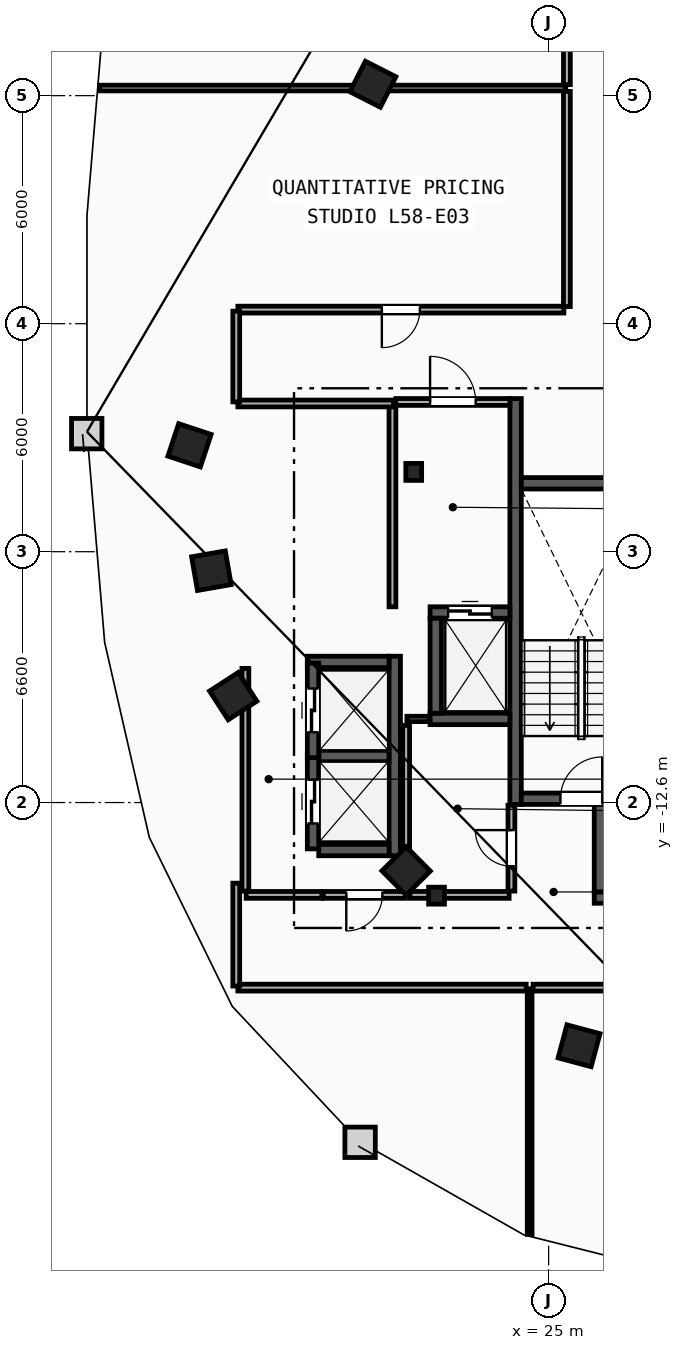
"""IFC4 building model, lengths in metres.
Left out: names, types, materials, properties, quantities, classifications, styles, units other than length and angle.
Written with IfcOpenShell. Run it as: python <this file> out.ifc"""

import sys

from ifc_helpers import new_model, si_unit, direction, frame, frame_2d, origin, origin_2d, place, context, subcontext, project, spatial, rectangle, i_section, extrude, element, fill, save


model = new_model("IFC4")
c1 = context("Model", 3, precision=1e-05, world=origin(), true_north=direction((0.0, 1.0)))
c2 = subcontext(c1, "Body", "Model", "MODEL_VIEW")
j1 = project(units=[si_unit("LENGTHUNIT", "METRE"), si_unit("PLANEANGLEUNIT", "RADIAN")], contexts=[c1])
p1 = place(None, origin())
s1 = spatial("IfcSite", under=j1, at=p1, CompositionType="ELEMENT")
p2 = place(p1, origin())
s2 = spatial("IfcBuilding", under=s1, at=p2, CompositionType="ELEMENT")
p3 = place(p2, frame((0.0, 0.0, 220.6)))
s3 = spatial("IfcBuildingStorey", under=s2, at=p3, CompositionType="ELEMENT", Elevation=220.6)
for number, where, z_axis, x_axis in (
    (1, (21.45, -3.9, 0.0), (0.0, 0.0, 1.0), (1.0, 0.0, 0.0)),
    (2, (22.05, -15.05, 0.0), (0.0, 0.0, 1.0), (1.0, 0.0, 0.0)),
):
    element("IfcColumn", number, at=place(p3, frame(where, z_axis=z_axis, x_axis=x_axis)), inside=s3, PredefinedType="COLUMN", context=c2, shape_type="SweptSolid", body=[
        extrude(i_section(OverallWidth=0.416, OverallDepth=0.446, WebThickness=0.039, FlangeThickness=0.063, FilletRadius=0.018, at=origin_2d()), origin(), (0.0, 0.0, 1.0), 3.6),
    ])
for number, where, z_axis, x_axis in (
    (3, (15.55, -3.2, 0.0), (0.0, 0.0, 1.0), (-0.315, -0.949, 0.0)),
    (4, (16.125, -6.5, 0.0), (0.0, 0.0, 1.0), (0.172, -0.985, 0.0)),
    (5, (16.7, -9.8, 0.0), (0.0, 0.0, 1.0), (0.544, -0.839, 0.0)),
    (6, (21.25, -14.4, 0.0), (0.0, 0.0, 1.0), (0.703, -0.711, 0.0)),
    (7, (25.8, -19.0, 0.0), (0.0, 0.0, 1.0), (0.966, -0.259, 0.0)),
    (8, (20.375, 6.3, 0.0), (0.0, 0.0, 1.0), (-0.453, -0.892, 0.0)),
):
    element("IfcColumn", number, at=place(p3, frame(where, z_axis=z_axis, x_axis=x_axis)), inside=s3, PredefinedType="COLUMN", context=c2, shape_type="SweptSolid", body=[
        extrude(rectangle(XDim=0.9, YDim=0.9, at=origin_2d()), origin(), (0.0, 0.0, 1.0), 3.6),
    ])
p4 = place(p3, frame((24.13, -12.65, 0.0), z_axis=(0.0, 0.0, 1.0), x_axis=(0.0, 1.0, 0.0)))
e9 = element("IfcWall", 9, at=p4, inside=s3, PredefinedType="SHEAR", context=c2, shape_type="SweptSolid", body=[
    extrude(rectangle(XDim=10.68, YDim=0.3, at=frame_2d((5.34, 0.0))), origin(), (0.0, 0.0, 1.0), 3.34),
])
p5 = place(p3, frame((24.28, -12.5, 0.0), z_axis=(0.0, 0.0, 1.0), x_axis=(1.0, 0.0, 0.0)))
e10 = element("IfcWall", 10, at=p5, inside=s3, PredefinedType="SHEAR", context=c2, shape_type="SweptSolid", body=[
    extrude(rectangle(XDim=3.16, YDim=0.3, at=frame_2d((1.58, 0.0))), origin(), (0.0, 0.0, 1.0), 3.34),
])
p6 = place(p5, frame((1.03, 0.0, 0.0)))
e11 = element("IfcOpeningElement", 11, at=p6, cuts=e10, PredefinedType="OPENING", context=c2, shape_type="SweptSolid", body=[
    extrude(rectangle(XDim=1.1, YDim=2.15, at=frame_2d((0.55, 1.075))), frame((0.0, 0.16, 0.0), z_axis=(0.0, -1.0, 0.0), x_axis=(1.0, 0.0, 0.0)), (0.0, 0.0, 1.0), 0.32),
])
p7 = place(p3, frame((24.28, -4.2, 0.0), z_axis=(0.0, 0.0, 1.0), x_axis=(1.0, 0.0, 0.0)))
e12 = element("IfcWall", 12, at=p7, inside=s3, PredefinedType="SHEAR", context=c2, shape_type="SweptSolid", body=[
    extrude(rectangle(XDim=3.16, YDim=0.3, at=frame_2d((1.58, 0.0))), origin(), (0.0, 0.0, 1.0), 3.34),
])
p8 = place(p3, frame((20.89, -7.45, 0.0), z_axis=(0.0, 0.0, 1.0), x_axis=(0.0, 1.0, 0.0)))
e13 = element("IfcWall", 13, at=p8, inside=s3, PredefinedType="PARTITIONING", context=c2, shape_type="SweptSolid", body=[
    extrude(rectangle(XDim=5.3, YDim=0.18, at=frame_2d((2.65, 0.0))), origin(), (0.0, 0.0, 1.0), 3.34),
])
p9 = place(p3, frame((20.98, -2.06, 0.0), z_axis=(0.0, 0.0, 1.0), x_axis=(1.0, 0.0, 0.0)))
e14 = element("IfcWall", 14, at=p9, inside=s3, PredefinedType="PARTITIONING", context=c2, shape_type="SweptSolid", body=[
    extrude(rectangle(XDim=3.0, YDim=0.18, at=frame_2d((1.5, 0.0))), origin(), (0.0, 0.0, 1.0), 3.34),
])
p10 = place(p9, frame((0.9, 0.0, 0.0)))
e15 = element("IfcOpeningElement", 15, at=p10, cuts=e14, PredefinedType="OPENING", context=c2, shape_type="SweptSolid", body=[
    extrude(rectangle(XDim=1.2, YDim=2.15, at=frame_2d((0.6, 1.075))), frame((0.0, 0.1, 0.0), z_axis=(0.0, -1.0, 0.0), x_axis=(1.0, 0.0, 0.0)), (0.0, 0.0, 1.0), 0.2),
])
p11 = place(p3, frame((21.88, -7.6, 0.0), z_axis=(0.0, 0.0, 1.0), x_axis=(1.0, 0.0, 0.0)))
e16 = element("IfcWall", 16, at=p11, inside=s3, PredefinedType="SHEAR", context=c2, shape_type="SweptSolid", body=[
    extrude(rectangle(XDim=2.1, YDim=0.3, at=frame_2d((1.05, 0.0))), origin(), (0.0, 0.0, 1.0), 3.34),
])
p12 = place(p11, frame((0.475, 0.0, 0.0)))
e17 = element("IfcOpeningElement", 17, at=p12, cuts=e16, PredefinedType="OPENING", context=c2, shape_type="SweptSolid", body=[
    extrude(rectangle(XDim=1.15, YDim=2.2, at=frame_2d((0.575, 1.1))), frame((0.0, 0.16, 0.0), z_axis=(0.0, -1.0, 0.0), x_axis=(1.0, 0.0, 0.0)), (0.0, 0.0, 1.0), 0.32),
])
p13 = place(p3, frame((21.88, -10.4, 0.0), z_axis=(0.0, 0.0, 1.0), x_axis=(1.0, 0.0, 0.0)))
e18 = element("IfcWall", 18, at=p13, inside=s3, PredefinedType="SHEAR", context=c2, shape_type="SweptSolid", body=[
    extrude(rectangle(XDim=2.1, YDim=0.3, at=frame_2d((1.05, 0.0))), origin(), (0.0, 0.0, 1.0), 3.34),
])
for number, where, z_axis, x_axis in (
    (19, (22.03, -10.25, 0.0), (0.0, 0.0, 1.0), (0.0, 1.0, 0.0)),
    (20, (26.2, -15.1, 0.0), (0.0, 0.0, 1.0), (1.0, 0.0, 0.0)),
):
    element("IfcWall", number, at=place(p3, frame(where, z_axis=z_axis, x_axis=x_axis)), inside=s3, PredefinedType="SHEAR", context=c2, shape_type="SweptSolid", body=[
        extrude(rectangle(XDim=2.5, YDim=0.3, at=frame_2d((1.25, 0.0))), origin(), (0.0, 0.0, 1.0), 3.34),
    ])
p14 = place(p3, frame((26.35, -14.95, 0.0), z_axis=(0.0, 0.0, 1.0), x_axis=(0.0, 1.0, 0.0)))
e21 = element("IfcWall", 21, at=p14, inside=s3, PredefinedType="SHEAR", context=c2, shape_type="SweptSolid", body=[
    extrude(rectangle(XDim=2.3, YDim=0.3, at=frame_2d((1.15, 0.0))), origin(), (0.0, 0.0, 1.0), 3.34),
])
p15 = place(p3, frame((20.95, -14.0, 0.0), z_axis=(0.0, 0.0, 1.0), x_axis=(0.0, 1.0, 0.0)))
e22 = element("IfcWall", 22, at=p15, inside=s3, PredefinedType="SHEAR", context=c2, shape_type="SweptSolid", body=[
    extrude(rectangle(XDim=5.25, YDim=0.3, at=frame_2d((2.625, 0.0))), origin(), (0.0, 0.0, 1.0), 3.34),
])
p16 = place(p3, frame((18.95, -13.85, 0.0), z_axis=(0.0, 0.0, 1.0), x_axis=(1.0, 0.0, 0.0)))
e23 = element("IfcWall", 23, at=p16, inside=s3, PredefinedType="SHEAR", context=c2, shape_type="SweptSolid", body=[
    extrude(rectangle(XDim=1.85, YDim=0.3, at=frame_2d((0.925, 0.0))), origin(), (0.0, 0.0, 1.0), 3.34),
])
p17 = place(p3, frame((18.65, -8.9, 0.0), z_axis=(0.0, 0.0, 1.0), x_axis=(1.0, 0.0, 0.0)))
e24 = element("IfcWall", 24, at=p17, inside=s3, PredefinedType="SHEAR", context=c2, shape_type="SweptSolid", body=[
    extrude(rectangle(XDim=2.15, YDim=0.3, at=frame_2d((1.075, 0.0))), origin(), (0.0, 0.0, 1.0), 3.34),
])
p18 = place(p3, frame((18.95, -11.375, 0.0), z_axis=(0.0, 0.0, 1.0), x_axis=(1.0, 0.0, 0.0)))
e25 = element("IfcWall", 25, at=p18, inside=s3, PredefinedType="SHEAR", context=c2, shape_type="SweptSolid", body=[
    extrude(rectangle(XDim=1.85, YDim=0.3, at=frame_2d((0.925, 0.0))), origin(), (0.0, 0.0, 1.0), 3.34),
])
p19 = place(p3, frame((18.8, -13.82, 0.0), z_axis=(0.0, 0.0, 1.0), x_axis=(0.0, 1.0, 0.0)))
e26 = element("IfcWall", 26, at=p19, inside=s3, PredefinedType="SHEAR", context=c2, shape_type="SweptSolid", body=[
    extrude(rectangle(XDim=2.49, YDim=0.3, at=frame_2d((1.245, 0.0))), origin(), (0.0, 0.0, 1.0), 3.34),
])
p20 = place(p19, frame((0.67, 0.0, 0.0)))
e27 = element("IfcOpeningElement", 27, at=p20, cuts=e26, PredefinedType="OPENING", context=c2, shape_type="SweptSolid", body=[
    extrude(rectangle(XDim=1.15, YDim=2.2, at=frame_2d((0.575, 1.1))), frame((0.0, 0.16, 0.0), z_axis=(0.0, -1.0, 0.0), x_axis=(1.0, 0.0, 0.0)), (0.0, 0.0, 1.0), 0.32),
])
p21 = place(p3, frame((18.8, -11.42, 0.0), z_axis=(0.0, 0.0, 1.0), x_axis=(0.0, 1.0, 0.0)))
e28 = element("IfcWall", 28, at=p21, inside=s3, PredefinedType="SHEAR", context=c2, shape_type="SweptSolid", body=[
    extrude(rectangle(XDim=2.49, YDim=0.3, at=frame_2d((1.245, 0.0))), origin(), (0.0, 0.0, 1.0), 3.34),
])
p22 = place(p21, frame((0.67, 0.0, 0.0)))
e29 = element("IfcOpeningElement", 29, at=p22, cuts=e28, PredefinedType="OPENING", context=c2, shape_type="SweptSolid", body=[
    extrude(rectangle(XDim=1.15, YDim=2.2, at=frame_2d((0.575, 1.1))), frame((0.0, 0.16, 0.0), z_axis=(0.0, -1.0, 0.0), x_axis=(1.0, 0.0, 0.0)), (0.0, 0.0, 1.0), 0.32),
])
p23 = place(p3, frame((17.02, -14.93, 0.0), z_axis=(0.0, 0.0, 1.0), x_axis=(0.0, 1.0, 0.0)))
e30 = element("IfcWall", 30, at=p23, inside=s3, PredefinedType="PARTITIONING", context=c2, shape_type="SweptSolid", body=[
    extrude(rectangle(XDim=5.86, YDim=0.18, at=frame_2d((2.93, 0.0))), origin(), (0.0, 0.0, 1.0), 3.34),
])
p24 = place(p3, frame((17.04, -15.03, 0.0), z_axis=(0.0, 0.0, 1.0), x_axis=(1.0, 0.0, 0.0)))
e31 = element("IfcWall", 31, at=p24, inside=s3, PredefinedType="PARTITIONING", context=c2, shape_type="SweptSolid", body=[
    extrude(rectangle(XDim=1.99, YDim=0.18, at=frame_2d((0.995, 0.0))), origin(), (0.0, 0.0, 1.0), 3.34),
])
p25 = place(p3, frame((21.23, -15.03, 0.0), z_axis=(0.0, 0.0, 1.0), x_axis=(-1.0, 0.0, 0.0)))
e32 = element("IfcWall", 32, at=p25, inside=s3, PredefinedType="PARTITIONING", context=c2, shape_type="SweptSolid", body=[
    extrude(rectangle(XDim=2.16, YDim=0.18, at=frame_2d((1.08, 0.0))), origin(), (0.0, 0.0, 1.0), 3.34),
])
p26 = place(p25, frame((0.605, 0.0, 0.0)))
e33 = element("IfcOpeningElement", 33, at=p26, cuts=e32, PredefinedType="OPENING", context=c2, shape_type="SweptSolid", body=[
    extrude(rectangle(XDim=0.95, YDim=2.1, at=frame_2d((0.475, 1.05))), frame((0.0, 0.1, 0.0), z_axis=(0.0, -1.0, 0.0), x_axis=(1.0, 0.0, 0.0)), (0.0, 0.0, 1.0), 0.2),
])
p27 = place(p3, frame((21.27, -10.4, 0.0), z_axis=(0.0, 0.0, 1.0), x_axis=(1.0, 0.0, 0.0)))
e34 = element("IfcWall", 34, at=p27, inside=s3, PredefinedType="PARTITIONING", context=c2, shape_type="SweptSolid", body=[
    extrude(rectangle(XDim=0.59, YDim=0.14, at=frame_2d((0.295, 0.0))), origin(), (0.0, 0.0, 1.0), 3.34),
])
p28 = place(p3, frame((21.25, -14.93, 0.0), z_axis=(0.0, 0.0, 1.0), x_axis=(0.0, 1.0, 0.0)))
e35 = element("IfcWall", 35, at=p28, inside=s3, PredefinedType="PARTITIONING", context=c2, shape_type="SweptSolid", body=[
    extrude(rectangle(XDim=4.36, YDim=0.18, at=frame_2d((2.18, 0.0))), origin(), (0.0, 0.0, 1.0), 3.34),
])
p29 = place(p3, frame((21.35, -15.03, 0.0), z_axis=(0.0, 0.0, 1.0), x_axis=(1.0, 0.0, 0.0)))
e36 = element("IfcWall", 36, at=p29, inside=s3, PredefinedType="PARTITIONING", context=c2, shape_type="SweptSolid", body=[
    extrude(rectangle(XDim=2.61, YDim=0.18, at=frame_2d((1.305, 0.0))), origin(), (0.0, 0.0, 1.0), 2.413),
])
p30 = place(p3, frame((24.02, -14.93, 0.0), z_axis=(0.0, 0.0, 1.0), x_axis=(0.0, 1.0, 0.0)))
e37 = element("IfcWall", 37, at=p30, inside=s3, PredefinedType="PARTITIONING", context=c2, shape_type="SweptSolid", body=[
    extrude(rectangle(XDim=2.26, YDim=0.18, at=frame_2d((1.13, 0.0))), origin(), (0.0, 0.0, 1.0), 3.34),
])
p31 = place(p30, frame((0.655, 0.0, 0.0)))
e38 = element("IfcOpeningElement", 38, at=p31, cuts=e37, PredefinedType="OPENING", context=c2, shape_type="SweptSolid", body=[
    extrude(rectangle(XDim=0.95, YDim=2.1, at=frame_2d((0.475, 1.05))), frame((0.0, 0.1, 0.0), z_axis=(0.0, -1.0, 0.0), x_axis=(1.0, 0.0, 0.0)), (0.0, 0.0, 1.0), 0.2),
])
p32 = place(p3, frame((13.183, 6.2, 0.0), z_axis=(0.0, 0.0, 1.0), x_axis=(1.0, 0.0, 0.0)))
e39 = element("IfcWall", 39, at=p32, inside=s3, PredefinedType="PARTITIONING", context=c2, shape_type="SweptSolid", body=[
    extrude(rectangle(XDim=12.267, YDim=0.15, at=frame_2d((6.133, 0.0))), origin(), (0.0, 0.0, 1.0), 3.34),
])
p33 = place(p3, frame((24.5, -23.963, 0.0), z_axis=(0.0, 0.0, 1.0), x_axis=(0.0, 1.0, 0.0)))
e40 = element("IfcWall", 40, at=p33, inside=s3, PredefinedType="PARTITIONING", context=c2, shape_type="SweptSolid", body=[
    extrude(rectangle(XDim=6.463, YDim=0.125, at=frame_2d((3.231, 0.0))), origin(), (0.0, 0.0, 1.0), 3.34),
])
p34 = place(p3, frame((24.59, -17.47, 0.0), z_axis=(0.0, 0.0, 1.0), x_axis=(1.0, 0.0, 0.0)))
e41 = element("IfcWall", 41, at=p34, inside=s3, PredefinedType="PARTITIONING", context=c2, shape_type="SweptSolid", body=[
    extrude(rectangle(XDim=7.82, YDim=0.18, at=frame_2d((3.91, 0.0))), origin(), (0.0, 0.0, 1.0), 3.34),
])
p35 = place(p34, frame((3.41, 0.0, 0.0)))
e42 = element("IfcOpeningElement", 42, at=p35, cuts=e41, PredefinedType="OPENING", context=c2, shape_type="SweptSolid", body=[
    extrude(rectangle(XDim=1.0, YDim=2.15, at=frame_2d((0.5, 1.075))), frame((0.0, 0.1, 0.0), z_axis=(0.0, -1.0, 0.0), x_axis=(1.0, 0.0, 0.0)), (0.0, 0.0, 1.0), 0.2),
])
p36 = place(p3, frame((25.4, 0.37, 0.0), z_axis=(0.0, 0.0, 1.0), x_axis=(-1.0, 0.0, 0.0)))
e43 = element("IfcWall", 43, at=p36, inside=s3, PredefinedType="PARTITIONING", context=c2, shape_type="SweptSolid", body=[
    extrude(rectangle(XDim=8.578, YDim=0.18, at=frame_2d((4.289, 0.0))), origin(), (0.0, 0.0, 1.0), 3.34),
])
p37 = place(p36, frame((3.789, 0.0, 0.0)))
e44 = element("IfcOpeningElement", 44, at=p37, cuts=e43, PredefinedType="OPENING", context=c2, shape_type="SweptSolid", body=[
    extrude(rectangle(XDim=1.0, YDim=2.15, at=frame_2d((0.5, 1.075))), frame((0.0, 0.1, 0.0), z_axis=(0.0, -1.0, 0.0), x_axis=(1.0, 0.0, 0.0)), (0.0, 0.0, 1.0), 0.2),
])
p38 = place(p3, frame((16.822, -17.47, 0.0), z_axis=(0.0, 0.0, 1.0), x_axis=(1.0, 0.0, 0.0)))
e45 = element("IfcWall", 45, at=p38, inside=s3, PredefinedType="PARTITIONING", context=c2, shape_type="SweptSolid", body=[
    extrude(rectangle(XDim=7.588, YDim=0.18, at=frame_2d((3.794, 0.0))), origin(), (0.0, 0.0, 1.0), 3.34),
])
p39 = place(p3, frame((25.48, 6.11, 0.0), z_axis=(0.0, 0.0, 1.0), x_axis=(0.0, -1.0, 0.0)))
e46 = element("IfcWall", 46, at=p39, inside=s3, PredefinedType="PARTITIONING", context=c2, shape_type="SweptSolid", body=[
    extrude(rectangle(XDim=5.66, YDim=0.18, at=frame_2d((2.83, 0.0))), origin(), (0.0, 0.0, 1.0), 3.34),
])
p40 = place(p3, frame((16.822, -2.1, 0.0), z_axis=(0.0, 0.0, 1.0), x_axis=(1.0, 0.0, 0.0)))
e47 = element("IfcWall", 47, at=p40, inside=s3, PredefinedType="PARTITIONING", context=c2, shape_type="SweptSolid", body=[
    extrude(rectangle(XDim=4.098, YDim=0.18, at=frame_2d((2.049, 0.0))), origin(), (0.0, 0.0, 1.0), 3.34),
])
p41 = place(p3, frame((16.78, -14.721, 0.0), z_axis=(0.0, 0.0, 1.0), x_axis=(0.0, -1.0, 0.0)))
e48 = element("IfcWall", 48, at=p41, inside=s3, PredefinedType="PARTITIONING", context=c2, shape_type="SweptSolid", body=[
    extrude(rectangle(XDim=2.707, YDim=0.18, at=frame_2d((1.354, 0.0))), origin(), (0.0, 0.0, 1.0), 3.34),
])
p42 = place(p3, frame((16.78, 0.329, 0.0), z_axis=(0.0, 0.0, 1.0), x_axis=(0.0, -1.0, 0.0)))
e49 = element("IfcWall", 49, at=p42, inside=s3, PredefinedType="PARTITIONING", context=c2, shape_type="SweptSolid", body=[
    extrude(rectangle(XDim=2.387, YDim=0.18, at=frame_2d((1.194, 0.0))), origin(), (0.0, 0.0, 1.0), 3.34),
])
p43 = place(p3, frame((25.48, 11.178, 0.0), z_axis=(0.0, 0.0, 1.0), x_axis=(0.0, -1.0, 0.0)))
e50 = element("IfcWall", 50, at=p43, inside=s3, PredefinedType="PARTITIONING", context=c2, shape_type="SweptSolid", body=[
    extrude(rectangle(XDim=4.888, YDim=0.18, at=frame_2d((2.444, 0.0))), origin(), (0.0, 0.0, 1.0), 3.34),
])
p44 = place(p6, origin())
e51 = element("IfcDoor", 51, at=p44, inside=s3, OperationType="SINGLE_SWING_RIGHT", PredefinedType="DOOR", context=c2, shape_type="SweptSolid", body=[
    extrude(rectangle(XDim=1.1, YDim=2.15, at=frame_2d((0.55, 1.075))), frame((0.0, 0.025, 0.0), z_axis=(0.0, -1.0, 0.0), x_axis=(1.0, 0.0, 0.0)), (0.0, 0.0, 1.0), 0.05),
])
fill(e11, e51)
p45 = place(p10, origin())
e52 = element("IfcDoor", 52, at=p45, inside=s3, OperationType="SINGLE_SWING_LEFT", PredefinedType="DOOR", context=c2, shape_type="SweptSolid", body=[
    extrude(rectangle(XDim=1.2, YDim=2.15, at=frame_2d((0.6, 1.075))), frame((0.0, 0.025, 0.0), z_axis=(0.0, -1.0, 0.0), x_axis=(1.0, 0.0, 0.0)), (0.0, 0.0, 1.0), 0.05),
])
fill(e15, e52)
p46 = place(p12, origin())
e53 = element("IfcDoor", 53, at=p46, inside=s3, OperationType="SLIDING_TO_LEFT", PredefinedType="TRAPDOOR", context=c2, shape_type="SweptSolid", body=[
    extrude(rectangle(XDim=1.15, YDim=2.2, at=frame_2d((0.575, 1.1))), frame((0.0, 0.025, 0.0), z_axis=(0.0, -1.0, 0.0), x_axis=(1.0, 0.0, 0.0)), (0.0, 0.0, 1.0), 0.05),
])
fill(e17, e53)
p47 = place(p20, origin())
e54 = element("IfcDoor", 54, at=p47, inside=s3, OperationType="SLIDING_TO_LEFT", PredefinedType="TRAPDOOR", context=c2, shape_type="SweptSolid", body=[
    extrude(rectangle(XDim=1.15, YDim=2.2, at=frame_2d((0.575, 1.1))), frame((0.0, 0.025, 0.0), z_axis=(0.0, -1.0, 0.0), x_axis=(1.0, 0.0, 0.0)), (0.0, 0.0, 1.0), 0.05),
])
fill(e27, e54)
p48 = place(p22, origin())
e55 = element("IfcDoor", 55, at=p48, inside=s3, OperationType="SLIDING_TO_LEFT", PredefinedType="TRAPDOOR", context=c2, shape_type="SweptSolid", body=[
    extrude(rectangle(XDim=1.15, YDim=2.2, at=frame_2d((0.575, 1.1))), frame((0.0, 0.025, 0.0), z_axis=(0.0, -1.0, 0.0), x_axis=(1.0, 0.0, 0.0)), (0.0, 0.0, 1.0), 0.05),
])
fill(e29, e55)
p49 = place(p37, origin())
e56 = element("IfcDoor", 56, at=p49, inside=s3, OperationType="SINGLE_SWING_RIGHT", PredefinedType="DOOR", context=c2, shape_type="SweptSolid", body=[
    extrude(rectangle(XDim=1.0, YDim=2.15, at=frame_2d((0.5, 1.075))), frame((0.0, 0.025, 0.0), z_axis=(0.0, -1.0, 0.0), x_axis=(1.0, 0.0, 0.0)), (0.0, 0.0, 1.0), 0.05),
])
fill(e44, e56)
p50 = place(p31, origin())
e57 = element("IfcDoor", 57, at=p50, inside=s3, OperationType="SINGLE_SWING_RIGHT", PredefinedType="DOOR", context=c2, shape_type="SweptSolid", body=[
    extrude(rectangle(XDim=0.95, YDim=2.1, at=frame_2d((0.475, 1.05))), frame((0.0, 0.025, 0.0), z_axis=(0.0, -1.0, 0.0), x_axis=(1.0, 0.0, 0.0)), (0.0, 0.0, 1.0), 0.05),
])
fill(e38, e57)
p51 = place(p26, origin())
e58 = element("IfcDoor", 58, at=p51, inside=s3, OperationType="SINGLE_SWING_RIGHT", PredefinedType="DOOR", context=c2, shape_type="SweptSolid", body=[
    extrude(rectangle(XDim=0.95, YDim=2.1, at=frame_2d((0.475, 1.05))), frame((0.0, 0.025, 0.0), z_axis=(0.0, -1.0, 0.0), x_axis=(1.0, 0.0, 0.0)), (0.0, 0.0, 1.0), 0.05),
])
fill(e33, e58)
save(model, sys.argv[1])
